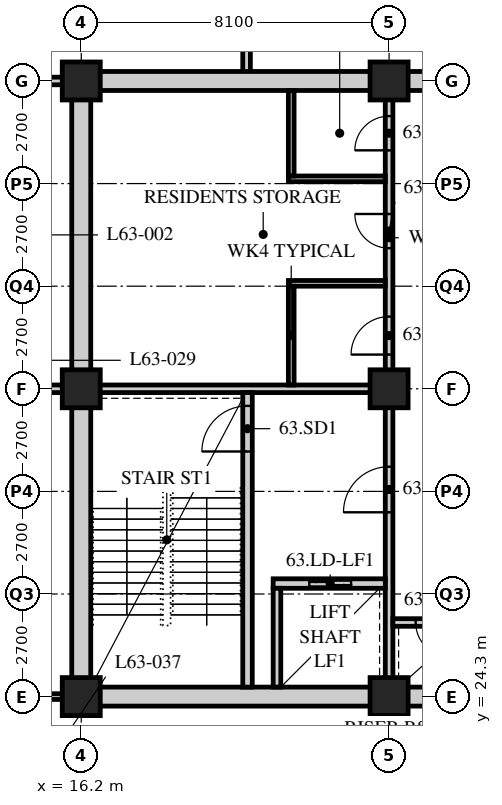
"""IFC4 building model, lengths in metres.
Left out: names, types, materials, properties, quantities, classifications, styles, units other than length and angle.
Written with IfcOpenShell. Run it as: python <this file> out.ifc"""

import sys

from ifc_helpers import new_model, si_unit, direction, frame, frame_2d, origin, origin_2d, place, context, subcontext, project, spatial, rectangle, hollow_rectangle, extrude, element, fill, save


model = new_model("IFC4")
c1 = context("Model", 3, precision=1e-05, world=origin(), true_north=direction((0.0, 1.0)))
c2 = subcontext(c1, "Body", "Model", "MODEL_VIEW")
j1 = project(units=[si_unit("LENGTHUNIT", "METRE"), si_unit("PLANEANGLEUNIT", "RADIAN")], contexts=[c1])
p1 = place(None, origin())
s1 = spatial("IfcSite", under=j1, at=p1, CompositionType="ELEMENT")
p2 = place(p1, origin())
s2 = spatial("IfcBuilding", under=s1, at=p2, CompositionType="ELEMENT")
p3 = place(p2, frame((0.0, 0.0, 246.3)))
s3 = spatial("IfcBuildingStorey", under=s2, at=p3, CompositionType="ELEMENT", Elevation=246.3)
for number, where, z_axis, x_axis in (
    (1, (16.2, 24.3, 0.0), (0.0, 0.0, 1.0), (1.0, 0.0, 0.0)),
    (2, (16.2, 32.4, 0.0), (0.0, 0.0, 1.0), (1.0, 0.0, 0.0)),
    (3, (16.2, 40.5, 0.0), (0.0, 0.0, 1.0), (1.0, 0.0, 0.0)),
    (4, (24.3, 24.3, 0.0), (0.0, 0.0, 1.0), (1.0, 0.0, 0.0)),
    (5, (24.3, 32.4, 0.0), (0.0, 0.0, 1.0), (1.0, 0.0, 0.0)),
    (6, (24.3, 40.5, 0.0), (0.0, 0.0, 1.0), (1.0, 0.0, 0.0)),
):
    element("IfcColumn", number, at=place(p3, frame(where, z_axis=z_axis, x_axis=x_axis)), inside=s3, PredefinedType="COLUMN", context=c2, shape_type="SweptSolid", body=[
        extrude(hollow_rectangle(XDim=1.0, YDim=1.0, WallThickness=0.1, at=origin_2d()), origin(), (0.0, 0.0, 1.0), 3.9),
    ])
p4 = place(p3, frame((16.0, 24.3, 0.0), z_axis=(0.0, 0.0, 1.0), x_axis=(-1.0, 0.0, 0.0)))
e7 = element("IfcWall", 7, at=p4, inside=s3, PredefinedType="PARTITIONING", context=c2, shape_type="SweptSolid", body=[
    extrude(rectangle(XDim=2.05, YDim=0.15, at=frame_2d((1.025, 0.0))), origin(), (0.0, 0.0, 1.0), 3.078),
])
p5 = place(p3, frame((13.95, 32.4, 0.0), z_axis=(0.0, 0.0, 1.0), x_axis=(1.0, 0.0, 0.0)))
e8 = element("IfcWall", 8, at=p5, inside=s3, PredefinedType="SOLIDWALL", context=c2, shape_type="SweptSolid", body=[
    extrude(rectangle(XDim=2.25, YDim=0.2, at=frame_2d((1.125, 0.0))), origin(), (0.0, 0.0, 1.0), 3.078),
])
p6 = place(p3, frame((20.55, 50.85, 0.0), z_axis=(0.0, 0.0, 1.0), x_axis=(0.0, -1.0, 0.0)))
e9 = element("IfcWall", 9, at=p6, inside=s3, PredefinedType="SOLIDWALL", context=c2, shape_type="SweptSolid", body=[
    extrude(rectangle(XDim=10.35, YDim=0.2, at=frame_2d((5.175, 0.0))), origin(), (0.0, 0.0, 1.0), 3.69),
])
p7 = place(p3, frame((13.95, 40.5, 0.0), z_axis=(0.0, 0.0, 1.0), x_axis=(1.0, 0.0, 0.0)))
e10 = element("IfcWall", 10, at=p7, inside=s3, PredefinedType="SOLIDWALL", context=c2, shape_type="SweptSolid", body=[
    extrude(rectangle(XDim=2.25, YDim=0.2, at=frame_2d((1.125, 0.0))), origin(), (0.0, 0.0, 1.0), 3.078),
])
p8 = place(p3, frame((15.95, 24.3, 0.0), z_axis=(0.0, 0.0, 1.0), x_axis=(1.0, 0.0, 0.0)))
e11 = element("IfcWall", 11, at=p8, inside=s3, PredefinedType="SOLIDWALL", context=c2, shape_type="SweptSolid", body=[
    extrude(rectangle(XDim=24.55, YDim=0.5, at=frame_2d((12.275, 0.0))), origin(), (0.0, 0.0, 1.0), 3.04),
])
p9 = place(p8, frame((11.5, 0.0, 0.0)))
e12 = element("IfcOpeningElement", 12, at=p9, cuts=e11, PredefinedType="OPENING", context=c2, shape_type="SweptSolid", body=[
    extrude(rectangle(XDim=1.8, YDim=2.4, at=frame_2d((0.9, 1.2))), frame((0.0, 0.26, 0.0), z_axis=(0.0, -1.0, 0.0), x_axis=(1.0, 0.0, 0.0)), (0.0, 0.0, 1.0), 0.52),
])
p10 = place(p3, frame((15.95, 40.5, 0.0), z_axis=(0.0, 0.0, 1.0), x_axis=(1.0, 0.0, 0.0)))
e13 = element("IfcWall", 13, at=p10, inside=s3, PredefinedType="SOLIDWALL", context=c2, shape_type="SweptSolid", body=[
    extrude(rectangle(XDim=24.55, YDim=0.5, at=frame_2d((12.275, 0.0))), origin(), (0.0, 0.0, 1.0), 3.04),
])
p11 = place(p10, frame((11.5, 0.0, 0.0)))
e14 = element("IfcOpeningElement", 14, at=p11, cuts=e13, PredefinedType="OPENING", context=c2, shape_type="SweptSolid", body=[
    extrude(rectangle(XDim=1.8, YDim=2.4, at=frame_2d((0.9, 1.2))), frame((0.0, 0.26, 0.0), z_axis=(0.0, -1.0, 0.0), x_axis=(1.0, 0.0, 0.0)), (0.0, 0.0, 1.0), 0.52),
])
p12 = place(p3, frame((16.2, 24.55, 0.0), z_axis=(0.0, 0.0, 1.0), x_axis=(0.0, 1.0, 0.0)))
e15 = element("IfcWall", 15, at=p12, inside=s3, PredefinedType="SOLIDWALL", context=c2, shape_type="SweptSolid", body=[
    extrude(rectangle(XDim=15.7, YDim=0.5, at=frame_2d((7.85, 0.0))), origin(), (0.0, 0.0, 1.0), 3.078),
])
p13 = place(p3, frame((16.45, 32.4, 0.0), z_axis=(0.0, 0.0, 1.0), x_axis=(1.0, 0.0, 0.0)))
e16 = element("IfcWall", 16, at=p13, inside=s3, PredefinedType="SOLIDWALL", context=c2, shape_type="SweptSolid", body=[
    extrude(rectangle(XDim=7.95, YDim=0.2, at=frame_2d((3.975, 0.0))), origin(), (0.0, 0.0, 1.0), 3.078),
])
p14 = place(p3, frame((24.3, 24.55, 0.0), z_axis=(0.0, 0.0, 1.0), x_axis=(0.0, 1.0, 0.0)))
e17 = element("IfcWall", 17, at=p14, inside=s3, PredefinedType="SOLIDWALL", context=c2, shape_type="SweptSolid", body=[
    extrude(rectangle(XDim=7.75, YDim=0.2, at=frame_2d((3.875, 0.0))), origin(), (0.0, 0.0, 1.0), 3.078),
])
p15 = place(p14, frame((4.6, 0.0, 0.0)))
e18 = element("IfcOpeningElement", 18, at=p15, cuts=e17, PredefinedType="OPENING", context=c2, shape_type="SweptSolid", body=[
    extrude(rectangle(XDim=1.2, YDim=2.1, at=frame_2d((0.6, 1.05))), frame((0.0, 0.11, 0.0), z_axis=(0.0, -1.0, 0.0), x_axis=(1.0, 0.0, 0.0)), (0.0, 0.0, 1.0), 0.22),
])
p16 = place(p3, frame((20.575, 24.55, 0.0), z_axis=(0.0, 0.0, 1.0), x_axis=(0.0, 1.0, 0.0)))
e19 = element("IfcWall", 19, at=p16, inside=s3, PredefinedType="SOLIDWALL", context=c2, shape_type="SweptSolid", body=[
    extrude(rectangle(XDim=7.75, YDim=0.25, at=frame_2d((3.875, 0.0))), origin(), (0.0, 0.0, 1.0), 3.69),
])
p17 = place(p16, frame((6.2, 0.0, 0.0)))
e20 = element("IfcOpeningElement", 20, at=p17, cuts=e19, PredefinedType="OPENING", context=c2, shape_type="SweptSolid", body=[
    extrude(rectangle(XDim=1.2, YDim=2.1, at=frame_2d((0.6, 1.05))), frame((0.0, 0.135, 0.0), z_axis=(0.0, -1.0, 0.0), x_axis=(1.0, 0.0, 0.0)), (0.0, 0.0, 1.0), 0.27),
])
p18 = place(p3, frame((21.25, 27.275, 0.0), z_axis=(0.0, 0.0, 1.0), x_axis=(1.0, 0.0, 0.0)))
e21 = element("IfcWall", 21, at=p18, inside=s3, PredefinedType="SOLIDWALL", context=c2, shape_type="SweptSolid", body=[
    extrude(rectangle(XDim=2.95, YDim=0.25, at=frame_2d((1.475, 0.0))), origin(), (0.0, 0.0, 1.0), 3.69),
])
p19 = place(p18, frame((0.95, 0.0, 0.0)))
e22 = element("IfcOpeningElement", 22, at=p19, cuts=e21, PredefinedType="OPENING", context=c2, shape_type="SweptSolid", body=[
    extrude(rectangle(XDim=1.1, YDim=2.4, at=frame_2d((0.55, 1.2))), frame((0.0, 0.135, 0.0), z_axis=(0.0, -1.0, 0.0), x_axis=(1.0, 0.0, 0.0)), (0.0, 0.0, 1.0), 0.27),
])
p20 = place(p3, frame((21.35, 24.55, 0.0), z_axis=(0.0, 0.0, 1.0), x_axis=(0.0, 1.0, 0.0)))
e23 = element("IfcWall", 23, at=p20, inside=s3, PredefinedType="SOLIDWALL", context=c2, shape_type="SweptSolid", body=[
    extrude(rectangle(XDim=2.6, YDim=0.2, at=frame_2d((1.3, 0.0))), origin(), (0.0, 0.0, 1.0), 3.69),
])
p21 = place(p3, frame((24.4, 26.25, 0.0), z_axis=(0.0, 0.0, 1.0), x_axis=(1.0, 0.0, 0.0)))
e24 = element("IfcWall", 24, at=p21, inside=s3, PredefinedType="SOLIDWALL", context=c2, shape_type="SweptSolid", body=[
    extrude(rectangle(XDim=2.15, YDim=0.2, at=frame_2d((1.075, 0.0))), origin(), (0.0, 0.0, 1.0), 3.69),
])
p22 = place(p21, frame((0.6, 0.0, 0.0)))
e25 = element("IfcOpeningElement", 25, at=p22, cuts=e24, PredefinedType="OPENING", context=c2, shape_type="SweptSolid", body=[
    extrude(rectangle(XDim=0.9, YDim=2.1, at=frame_2d((0.45, 1.05))), frame((0.0, 0.11, 0.0), z_axis=(0.0, -1.0, 0.0), x_axis=(1.0, 0.0, 0.0)), (0.0, 0.0, 1.0), 0.22),
])
p23 = place(p3, frame((24.3, 32.5, 0.0), z_axis=(0.0, 0.0, 1.0), x_axis=(0.0, 1.0, 0.0)))
e26 = element("IfcWall", 26, at=p23, inside=s3, PredefinedType="PARTITIONING", context=c2, shape_type="SweptSolid", body=[
    extrude(rectangle(XDim=7.75, YDim=0.2, at=frame_2d((3.875, 0.0))), origin(), (0.0, 0.0, 1.0), 3.078),
])
p24 = place(p23, frame((0.8, 0.0, 0.0)))
e27 = element("IfcOpeningElement", 27, at=p24, cuts=e26, PredefinedType="OPENING", context=c2, shape_type="SweptSolid", body=[
    extrude(rectangle(XDim=1.0, YDim=2.1, at=frame_2d((0.5, 1.05))), frame((0.0, 0.11, 0.0), z_axis=(0.0, -1.0, 0.0), x_axis=(1.0, 0.0, 0.0)), (0.0, 0.0, 1.0), 0.22),
])
p25 = place(p23, frame((3.6, 0.0, 0.0)))
e28 = element("IfcOpeningElement", 28, at=p25, cuts=e26, PredefinedType="OPENING", context=c2, shape_type="SweptSolid", body=[
    extrude(rectangle(XDim=0.9, YDim=2.1, at=frame_2d((0.45, 1.05))), frame((0.0, 0.11, 0.0), z_axis=(0.0, -1.0, 0.0), x_axis=(1.0, 0.0, 0.0)), (0.0, 0.0, 1.0), 0.22),
])
p26 = place(p23, frame((6.175, 0.0, 0.0)))
e29 = element("IfcOpeningElement", 29, at=p26, cuts=e26, PredefinedType="OPENING", context=c2, shape_type="SweptSolid", body=[
    extrude(rectangle(XDim=0.9, YDim=2.1, at=frame_2d((0.45, 1.05))), frame((0.0, 0.11, 0.0), z_axis=(0.0, -1.0, 0.0), x_axis=(1.0, 0.0, 0.0)), (0.0, 0.0, 1.0), 0.22),
])
for number, where, z_axis, x_axis in (
    (30, (21.65, 35.175, 0.0), (0.0, 0.0, 1.0), (1.0, 0.0, 0.0)),
    (31, (21.65, 37.925, 0.0), (0.0, 0.0, 1.0), (1.0, 0.0, 0.0)),
):
    element("IfcWall", number, at=place(p3, frame(where, z_axis=z_axis, x_axis=x_axis)), inside=s3, PredefinedType="PARTITIONING", context=c2, shape_type="SweptSolid", body=[
        extrude(rectangle(XDim=2.55, YDim=0.15, at=frame_2d((1.275, 0.0))), origin(), (0.0, 0.0, 1.0), 3.69),
    ])
p27 = place(p3, frame((21.725, 32.5, 0.0), z_axis=(0.0, 0.0, 1.0), x_axis=(0.0, 1.0, 0.0)))
e32 = element("IfcWall", 32, at=p27, inside=s3, PredefinedType="PARTITIONING", context=c2, shape_type="SweptSolid", body=[
    extrude(rectangle(XDim=2.6, YDim=0.15, at=frame_2d((1.3, 0.0))), origin(), (0.0, 0.0, 1.0), 3.69),
])
p28 = place(p3, frame((21.725, 38.0, 0.0), z_axis=(0.0, 0.0, 1.0), x_axis=(0.0, 1.0, 0.0)))
e33 = element("IfcWall", 33, at=p28, inside=s3, PredefinedType="PARTITIONING", context=c2, shape_type="SweptSolid", body=[
    extrude(rectangle(XDim=2.25, YDim=0.15, at=frame_2d((1.125, 0.0))), origin(), (0.0, 0.0, 1.0), 3.69),
])
p29 = place(p24, origin())
e34 = element("IfcDoor", 34, at=p29, inside=s3, OperationType="SINGLE_SWING_LEFT", PredefinedType="DOOR", context=c2, shape_type="SweptSolid", body=[
    extrude(rectangle(XDim=1.0, YDim=2.1, at=frame_2d((0.5, 1.05))), frame((0.0, 0.025, 0.0), z_axis=(0.0, -1.0, 0.0), x_axis=(1.0, 0.0, 0.0)), (0.0, 0.0, 1.0), 0.05),
])
fill(e27, e34)
p30 = place(p25, origin())
e35 = element("IfcDoor", 35, at=p30, inside=s3, OperationType="SINGLE_SWING_RIGHT", PredefinedType="DOOR", context=c2, shape_type="SweptSolid", body=[
    extrude(rectangle(XDim=0.9, YDim=2.1, at=frame_2d((0.45, 1.05))), frame((0.0, 0.025, 0.0), z_axis=(0.0, -1.0, 0.0), x_axis=(1.0, 0.0, 0.0)), (0.0, 0.0, 1.0), 0.05),
])
fill(e28, e35)
p31 = place(p26, origin())
e36 = element("IfcDoor", 36, at=p31, inside=s3, OperationType="SINGLE_SWING_LEFT", PredefinedType="DOOR", context=c2, shape_type="SweptSolid", body=[
    extrude(rectangle(XDim=0.9, YDim=2.1, at=frame_2d((0.45, 1.05))), frame((0.0, 0.025, 0.0), z_axis=(0.0, -1.0, 0.0), x_axis=(1.0, 0.0, 0.0)), (0.0, 0.0, 1.0), 0.05),
])
fill(e29, e36)
p32 = place(p17, origin())
e37 = element("IfcDoor", 37, at=p32, inside=s3, OperationType="SINGLE_SWING_LEFT", PredefinedType="DOOR", context=c2, shape_type="SweptSolid", body=[
    extrude(rectangle(XDim=1.2, YDim=2.1, at=frame_2d((0.6, 1.05))), frame((0.0, 0.025, 0.0), z_axis=(0.0, -1.0, 0.0), x_axis=(1.0, 0.0, 0.0)), (0.0, 0.0, 1.0), 0.05),
])
fill(e20, e37)
p33 = place(p15, origin())
e38 = element("IfcDoor", 38, at=p33, inside=s3, OperationType="SINGLE_SWING_LEFT", PredefinedType="DOOR", context=c2, shape_type="SweptSolid", body=[
    extrude(rectangle(XDim=1.2, YDim=2.1, at=frame_2d((0.6, 1.05))), frame((0.0, 0.025, 0.0), z_axis=(0.0, -1.0, 0.0), x_axis=(1.0, 0.0, 0.0)), (0.0, 0.0, 1.0), 0.05),
])
fill(e18, e38)
p34 = place(p22, origin())
e39 = element("IfcDoor", 39, at=p34, inside=s3, OperationType="SINGLE_SWING_LEFT", PredefinedType="DOOR", context=c2, shape_type="SweptSolid", body=[
    extrude(rectangle(XDim=0.9, YDim=2.1, at=frame_2d((0.45, 1.05))), frame((0.0, 0.025, 0.0), z_axis=(0.0, -1.0, 0.0), x_axis=(1.0, 0.0, 0.0)), (0.0, 0.0, 1.0), 0.05),
])
fill(e25, e39)
p35 = place(p19, origin())
e40 = element("IfcDoor", 40, at=p35, inside=s3, OperationType="DOUBLE_DOOR_SLIDING", PredefinedType="DOOR", context=c2, shape_type="SweptSolid", body=[
    extrude(rectangle(XDim=1.1, YDim=2.4, at=frame_2d((0.55, 1.2))), frame((0.0, 0.025, 0.0), z_axis=(0.0, -1.0, 0.0), x_axis=(1.0, 0.0, 0.0)), (0.0, 0.0, 1.0), 0.05),
])
fill(e22, e40)
save(model, sys.argv[1])
